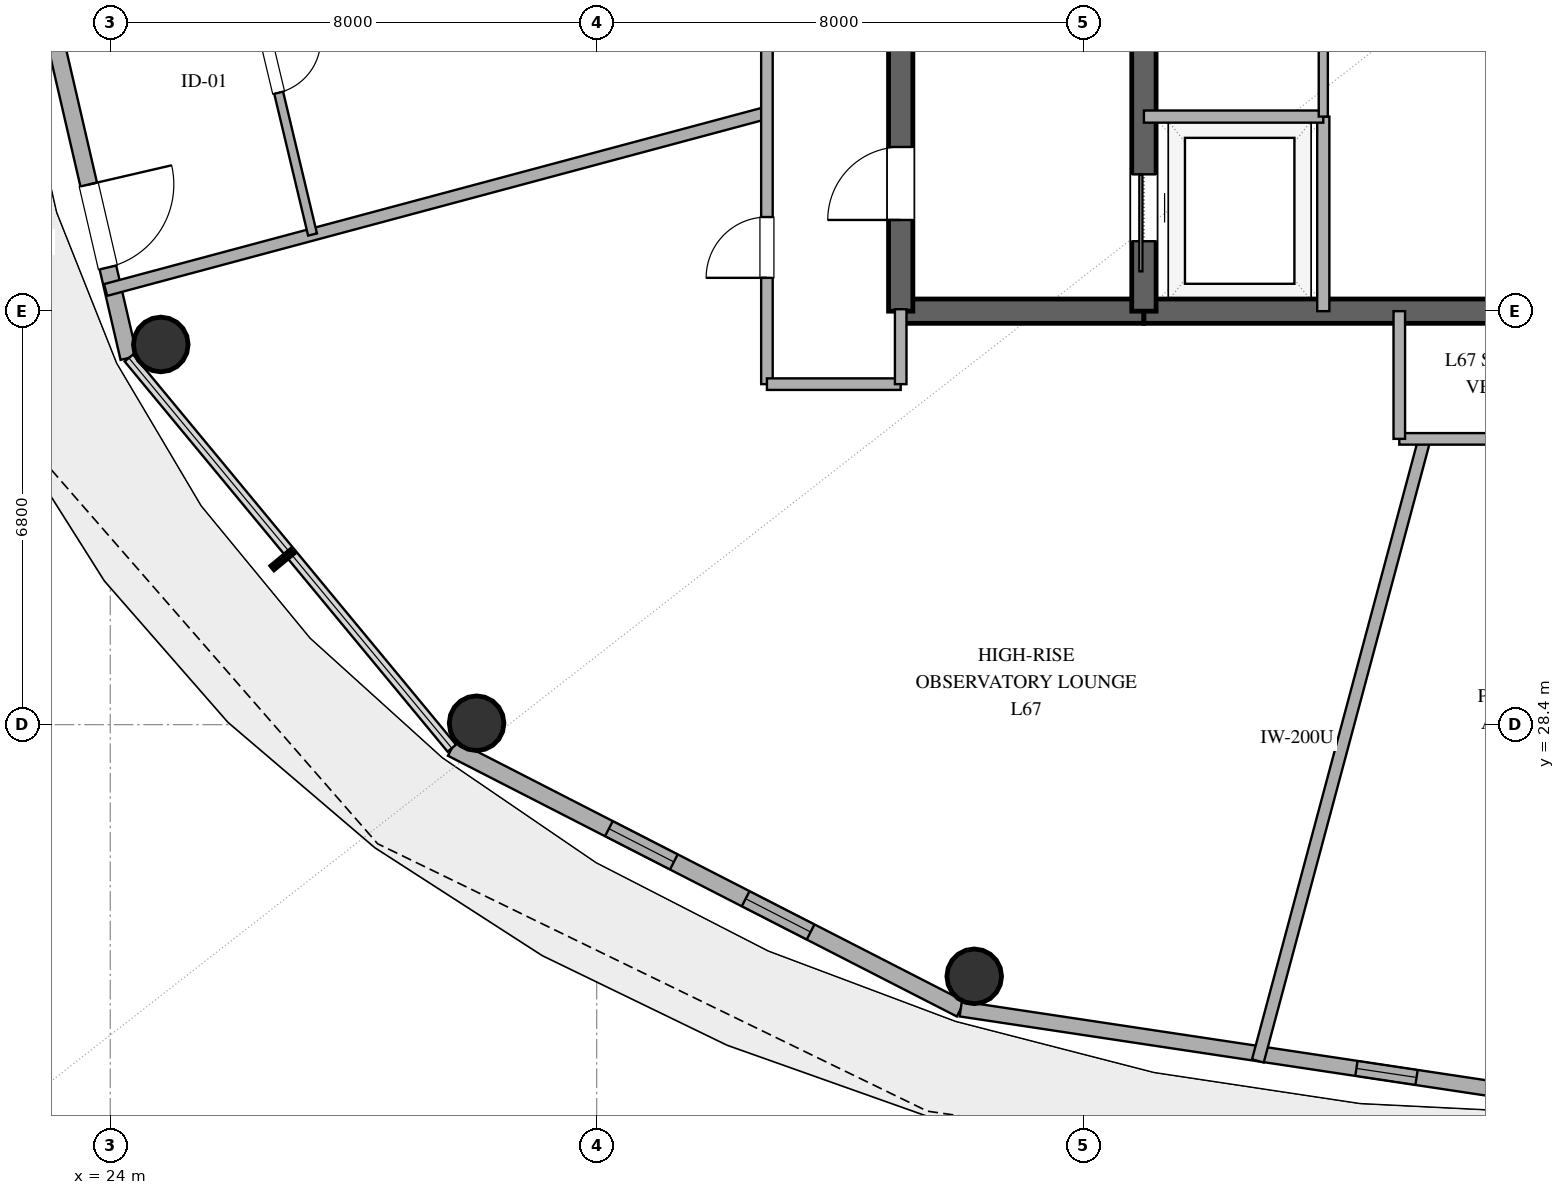
"""IFC4 building model, lengths in metres.
Left out: names, types, materials, properties, quantities, classifications, styles, units other than length and angle.
Written with IfcOpenShell. Run it as: python <this file> out.ifc"""

import sys

from ifc_helpers import new_model, si_unit, direction, frame, frame_2d, origin, origin_2d, place, context, subcontext, project, spatial, rectangle, hollow_circle, extrude, element, fill, save


model = new_model("IFC4")
c1 = context("Model", 3, precision=1e-05, world=origin(), true_north=direction((0.0, 1.0)))
c2 = subcontext(c1, "Body", "Model", "MODEL_VIEW")
j1 = project(units=[si_unit("LENGTHUNIT", "METRE"), si_unit("PLANEANGLEUNIT", "RADIAN")], contexts=[c1])
p1 = place(None, origin())
s1 = spatial("IfcSite", under=j1, at=p1, CompositionType="ELEMENT")
p2 = place(p1, origin())
s2 = spatial("IfcBuilding", under=s1, at=p2, CompositionType="ELEMENT")
p3 = place(p2, frame((0.0, 0.0, 262.2)))
s3 = spatial("IfcBuildingStorey", under=s2, at=p3, CompositionType="ELEMENT", Elevation=262.2)
p4 = place(p3, frame((37.0, 35.2, 0.0), z_axis=(0.0, 0.0, 1.0), x_axis=(1.0, 0.0, 0.0)))
e1 = element("IfcWall", 1, at=p4, inside=s3, PredefinedType="SHEAR", context=c2, shape_type="SweptSolid", body=[
    extrude(rectangle(XDim=4.0, YDim=0.4, at=frame_2d((2.0, 0.0))), origin(), (0.0, 0.0, 1.0), 3.37),
])
p5 = place(p3, frame((41.0, 35.2, 0.0), z_axis=(0.0, 0.0, 1.0), x_axis=(1.0, 0.0, 0.0)))
e2 = element("IfcWall", 2, at=p5, inside=s3, PredefinedType="SHEAR", context=c2, shape_type="SweptSolid", body=[
    extrude(rectangle(XDim=14.0, YDim=0.4, at=frame_2d((7.0, 0.0))), origin(), (0.0, 0.0, 1.0), 3.37),
])
p6 = place(p5, frame((6.1, 0.0, 0.0)))
e3 = element("IfcOpeningElement", 3, at=p6, cuts=e2, PredefinedType="OPENING", context=c2, shape_type="SweptSolid", body=[
    extrude(rectangle(XDim=1.8, YDim=2.25, at=frame_2d((0.9, 1.125))), frame((0.0, 0.21, 0.0), z_axis=(0.0, -1.0, 0.0), x_axis=(1.0, 0.0, 0.0)), (0.0, 0.0, 1.0), 0.42),
])
p7 = place(p3, frame((37.0, 35.2, 0.0), z_axis=(0.0, 0.0, 1.0), x_axis=(0.0, 1.0, 0.0)))
e4 = element("IfcWall", 4, at=p7, inside=s3, PredefinedType="SHEAR", context=c2, shape_type="SweptSolid", body=[
    extrude(rectangle(XDim=13.6, YDim=0.4, at=frame_2d((6.8, 0.0))), origin(), (0.0, 0.0, 1.0), 3.37),
])
p8 = place(p7, frame((1.5, 0.0, 0.0)))
e5 = element("IfcOpeningElement", 5, at=p8, cuts=e4, PredefinedType="OPENING", context=c2, shape_type="SweptSolid", body=[
    extrude(rectangle(XDim=1.2, YDim=2.15, at=frame_2d((0.6, 1.075))), frame((0.0, 0.21, 0.0), z_axis=(0.0, -1.0, 0.0), x_axis=(1.0, 0.0, 0.0)), (0.0, 0.0, 1.0), 0.42),
])
p9 = place(p3, frame((41.0, 35.2, 0.0), z_axis=(0.0, 0.0, 1.0), x_axis=(0.0, 1.0, 0.0)))
e6 = element("IfcWall", 6, at=p9, inside=s3, PredefinedType="SHEAR", context=c2, shape_type="SweptSolid", body=[
    extrude(rectangle(XDim=13.6, YDim=0.4, at=frame_2d((6.8, 0.0))), origin(), (0.0, 0.0, 1.0), 3.37),
])
p10 = place(p9, frame((1.15, 0.0, 0.0)))
e7 = element("IfcOpeningElement", 7, at=p10, cuts=e6, PredefinedType="OPENING", context=c2, shape_type="SweptSolid", body=[
    extrude(rectangle(XDim=1.1, YDim=2.2, at=frame_2d((0.55, 1.1))), frame((0.0, 0.21, 0.0), z_axis=(0.0, -1.0, 0.0), x_axis=(1.0, 0.0, 0.0)), (0.0, 0.0, 1.0), 0.42),
])
for number, where, z_axis, x_axis in (
    (8, (24.831, 34.653, 0.0), (0.0, 0.0, 1.0), (1.0, 0.0, 0.0)),
    (9, (30.025, 28.424, 0.0), (0.0, 0.0, 1.0), (1.0, 0.0, 0.0)),
    (10, (38.209, 24.261, 0.0), (0.0, 0.0, 1.0), (1.0, 0.0, 0.0)),
):
    element("IfcColumn", number, at=place(p3, frame(where, z_axis=z_axis, x_axis=x_axis)), inside=s3, PredefinedType="COLUMN", context=c2, shape_type="SweptSolid", body=[
        extrude(hollow_circle(Radius=0.45, WallThickness=0.025, at=origin_2d()), origin(), (0.0, 0.0, 1.0), 3.37),
    ])
p11 = place(p3, frame((22.553, 42.0, 0.0), z_axis=(0.0, 0.0, 1.0), x_axis=(0.225635078214, -0.974211892495, 0.0)))
e11 = element("IfcWall", 11, at=p11, inside=s3, PredefinedType="SOLIDWALL", context=c2, shape_type="SweptSolid", body=[
    extrude(rectangle(XDim=7.77, YDim=0.28, at=frame_2d((3.885, 0.0))), origin(), (0.0, 0.0, 1.0), 3.37),
])
p12 = place(p11, frame((4.842, 0.0, 0.0)))
e12 = element("IfcOpeningElement", 12, at=p12, cuts=e11, PredefinedType="OPENING", context=c2, shape_type="SweptSolid", body=[
    extrude(rectangle(XDim=1.4, YDim=2.2, at=frame_2d((0.7, 1.1))), frame((0.0, 0.15, 0.0), z_axis=(0.0, -1.0, 0.0), x_axis=(1.0, 0.0, 0.0)), (0.0, 0.0, 1.0), 0.3),
])
p13 = place(p3, frame((29.617, 28.013, 0.0), z_axis=(0.0, 0.0, 1.0), x_axis=(0.890007394051, -0.455946091699, 0.0)))
e13 = element("IfcWall", 13, at=p13, inside=s3, PredefinedType="SOLIDWALL", context=c2, shape_type="SweptSolid", body=[
    extrude(rectangle(XDim=9.404, YDim=0.28, at=frame_2d((4.702, 0.0))), origin(), (0.0, 0.0, 1.0), 3.37),
])
p14 = place(p13, frame((2.903, 0.0, 0.85)))
e14 = element("IfcOpeningElement", 14, at=p14, cuts=e13, PredefinedType="OPENING", context=c2, shape_type="SweptSolid", body=[
    extrude(rectangle(XDim=1.2, YDim=1.8, at=frame_2d((0.6, 0.9))), frame((0.0, 0.15, 0.0), z_axis=(0.0, -1.0, 0.0), x_axis=(1.0, 0.0, 0.0)), (0.0, 0.0, 1.0), 0.3),
])
p15 = place(p13, frame((5.43, 0.0, 0.85)))
e15 = element("IfcOpeningElement", 15, at=p15, cuts=e13, PredefinedType="OPENING", context=c2, shape_type="SweptSolid", body=[
    extrude(rectangle(XDim=1.2, YDim=1.8, at=frame_2d((0.6, 0.9))), frame((0.0, 0.15, 0.0), z_axis=(0.0, -1.0, 0.0), x_axis=(1.0, 0.0, 0.0)), (0.0, 0.0, 1.0), 0.3),
])
p16 = place(p3, frame((37.987, 23.726, 0.0), z_axis=(0.0, 0.0, 1.0), x_axis=(0.988882522213, -0.148698881169, 0.0)))
e16 = element("IfcWall", 16, at=p16, inside=s3, PredefinedType="SOLIDWALL", context=c2, shape_type="SweptSolid", body=[
    extrude(rectangle(XDim=10.125, YDim=0.25, at=frame_2d((5.062, 0.0))), origin(), (0.0, 0.0, 1.0), 3.37),
])
p17 = place(p16, frame((6.581, 0.0, 1.42)))
e17 = element("IfcOpeningElement", 17, at=p17, cuts=e16, PredefinedType="OPENING", context=c2, shape_type="SweptSolid", body=[
    extrude(rectangle(XDim=1.0, YDim=1.05, at=frame_2d((0.5, 0.525))), frame((0.0, 0.135, 0.0), z_axis=(0.0, -1.0, 0.0), x_axis=(1.0, 0.0, 0.0)), (0.0, 0.0, 1.0), 0.27),
])
p18 = place(p3, frame((43.95, 35.2, 0.0), z_axis=(0.0, 0.0, 1.0), x_axis=(0.0, 1.0, 0.0)))
e18 = element("IfcWall", 18, at=p18, inside=s3, PredefinedType="SOLIDWALL", context=c2, shape_type="SweptSolid", body=[
    extrude(rectangle(XDim=3.2, YDim=0.2, at=frame_2d((1.6, 0.0))), origin(), (0.0, 0.0, 1.0), 2.73),
])
p19 = place(p3, frame((41.0, 38.4, 0.0), z_axis=(0.0, 0.0, 1.0), x_axis=(1.0, 0.0, 0.0)))
e19 = element("IfcWall", 19, at=p19, inside=s3, PredefinedType="SOLIDWALL", context=c2, shape_type="SweptSolid", body=[
    extrude(rectangle(XDim=2.95, YDim=0.2, at=frame_2d((1.475, 0.0))), origin(), (0.0, 0.0, 1.0), 2.73),
])
p20 = place(p3, frame((43.95, 38.4, 0.0), z_axis=(0.0, 0.0, 1.0), x_axis=(0.0, 1.0, 0.0)))
e20 = element("IfcWall", 20, at=p20, inside=s3, PredefinedType="PARTITIONING", context=c2, shape_type="SweptSolid", body=[
    extrude(rectangle(XDim=4.0, YDim=0.15, at=frame_2d((2.0, 0.0))), origin(), (0.0, 0.0, 1.0), 2.73),
])
p21 = place(p20, frame((1.5, 0.0, 0.0)))
e21 = element("IfcOpeningElement", 21, at=p21, cuts=e20, PredefinedType="OPENING", context=c2, shape_type="SweptSolid", body=[
    extrude(rectangle(XDim=0.9, YDim=2.15, at=frame_2d((0.45, 1.075))), frame((0.0, 0.085, 0.0), z_axis=(0.0, -1.0, 0.0), x_axis=(1.0, 0.0, 0.0)), (0.0, 0.0, 1.0), 0.17),
])
p22 = place(p3, frame((42.874, 22.87, 0.0), z_axis=(0.0, 0.0, 1.0), x_axis=(0.258827496332, 0.965923561749, 0.0)))
e22 = element("IfcWall", 22, at=p22, inside=s3, PredefinedType="PARTITIONING", context=c2, shape_type="SweptSolid", body=[
    extrude(rectangle(XDim=10.591, YDim=0.2, at=frame_2d((5.295, 0.0))), origin(), (0.0, 0.0, 1.0), 2.73),
])
p23 = place(p3, frame((23.924, 35.549, 0.0), z_axis=(0.0, 0.0, 1.0), x_axis=(0.965923661364, 0.258827124578, 0.0)))
e23 = element("IfcWall", 23, at=p23, inside=s3, PredefinedType="PARTITIONING", context=c2, shape_type="SweptSolid", body=[
    extrude(rectangle(XDim=11.26, YDim=0.2, at=frame_2d((5.63, 0.0))), origin(), (0.0, 0.0, 1.0), 2.73),
])
p24 = place(p3, frame((34.8, 34.0, 0.0), z_axis=(0.0, 0.0, 1.0), x_axis=(0.0, 1.0, 0.0)))
e24 = element("IfcWall", 24, at=p24, inside=s3, PredefinedType="PARTITIONING", context=c2, shape_type="SweptSolid", body=[
    extrude(rectangle(XDim=12.196, YDim=0.19, at=frame_2d((6.098, 0.0))), origin(), (0.0, 0.0, 1.0), 2.73),
])
p25 = place(p24, frame((1.748, 0.0, 0.0)))
e25 = element("IfcOpeningElement", 25, at=p25, cuts=e24, PredefinedType="OPENING", context=c2, shape_type="SweptSolid", body=[
    extrude(rectangle(XDim=1.0, YDim=2.2, at=frame_2d((0.5, 1.1))), frame((0.0, 0.105, 0.0), z_axis=(0.0, -1.0, 0.0), x_axis=(1.0, 0.0, 0.0)), (0.0, 0.0, 1.0), 0.21),
])
p26 = place(p3, frame((26.004, 42.0, 0.0), z_axis=(0.0, 0.0, 1.0), x_axis=(0.232304342064, -0.972643147644, 0.0)))
e26 = element("IfcWall", 26, at=p26, inside=s3, PredefinedType="PARTITIONING", context=c2, shape_type="SweptSolid", body=[
    extrude(rectangle(XDim=5.695, YDim=0.15, at=frame_2d((2.848, 0.0))), origin(), (0.0, 0.0, 1.0), 2.73),
])
p27 = place(p26, frame((2.398, 0.0, 0.0)))
e27 = element("IfcOpeningElement", 27, at=p27, cuts=e26, PredefinedType="OPENING", context=c2, shape_type="SweptSolid", body=[
    extrude(rectangle(XDim=0.9, YDim=2.1, at=frame_2d((0.45, 1.05))), frame((0.0, 0.085, 0.0), z_axis=(0.0, -1.0, 0.0), x_axis=(1.0, 0.0, 0.0)), (0.0, 0.0, 1.0), 0.17),
])
p28 = place(p3, frame((50.8, 33.1, 0.0), z_axis=(0.0, 0.0, 1.0), x_axis=(-1.0, 0.0, 0.0)))
e28 = element("IfcWall", 28, at=p28, inside=s3, PredefinedType="PARTITIONING", context=c2, shape_type="SweptSolid", body=[
    extrude(rectangle(XDim=5.6, YDim=0.19, at=frame_2d((2.8, 0.0))), origin(), (0.0, 0.0, 1.0), 2.73),
])
p29 = place(p28, frame((2.3, 0.0, 0.0)))
e29 = element("IfcOpeningElement", 29, at=p29, cuts=e28, PredefinedType="OPENING", context=c2, shape_type="SweptSolid", body=[
    extrude(rectangle(XDim=1.0, YDim=2.2, at=frame_2d((0.5, 1.1))), frame((0.0, 0.105, 0.0), z_axis=(0.0, -1.0, 0.0), x_axis=(1.0, 0.0, 0.0)), (0.0, 0.0, 1.0), 0.21),
])
p30 = place(p3, frame((37.0, 34.0, 0.0), z_axis=(0.0, 0.0, 1.0), x_axis=(-1.0, 0.0, 0.0)))
e30 = element("IfcWall", 30, at=p30, inside=s3, PredefinedType="PARTITIONING", context=c2, shape_type="SweptSolid", body=[
    extrude(rectangle(XDim=2.2, YDim=0.19, at=frame_2d((1.1, 0.0))), origin(), (0.0, 0.0, 1.0), 2.73),
])
p31 = place(p3, frame((45.2, 35.2, 0.0), z_axis=(0.0, 0.0, 1.0), x_axis=(0.0, -1.0, 0.0)))
e31 = element("IfcWall", 31, at=p31, inside=s3, PredefinedType="PARTITIONING", context=c2, shape_type="SweptSolid", body=[
    extrude(rectangle(XDim=2.1, YDim=0.19, at=frame_2d((1.05, 0.0))), origin(), (0.0, 0.0, 1.0), 2.73),
])
p32 = place(p3, frame((37.0, 35.232, 0.0), z_axis=(0.0, 0.0, 1.0), x_axis=(0.0, -1.0, 0.0)))
e32 = element("IfcWall", 32, at=p32, inside=s3, PredefinedType="PARTITIONING", context=c2, shape_type="SweptSolid", body=[
    extrude(rectangle(XDim=1.232, YDim=0.19, at=frame_2d((0.616, 0.0))), origin(), (0.0, 0.0, 1.0), 2.73),
])
p33 = place(p12, origin())
e33 = element("IfcDoor", 33, at=p33, inside=s3, OperationType="SINGLE_SWING_LEFT", PredefinedType="DOOR", context=c2, shape_type="SweptSolid", body=[
    extrude(rectangle(XDim=1.4, YDim=2.2, at=frame_2d((0.7, 1.1))), frame((0.0, 0.025, 0.0), z_axis=(0.0, -1.0, 0.0), x_axis=(1.0, 0.0, 0.0)), (0.0, 0.0, 1.0), 0.05),
])
fill(e12, e33)
p34 = place(p14, origin())
e34 = element("IfcWindow", 34, at=p34, inside=s3, PartitioningType="SINGLE_PANEL", PredefinedType="WINDOW", context=c2, shape_type="SweptSolid", body=[
    extrude(rectangle(XDim=1.2, YDim=1.8, at=frame_2d((0.6, 0.9))), frame((0.0, 0.03, 0.0), z_axis=(0.0, -1.0, 0.0), x_axis=(1.0, 0.0, 0.0)), (0.0, 0.0, 1.0), 0.06),
])
fill(e14, e34)
p35 = place(p15, origin())
e35 = element("IfcWindow", 35, at=p35, inside=s3, PartitioningType="SINGLE_PANEL", PredefinedType="WINDOW", context=c2, shape_type="SweptSolid", body=[
    extrude(rectangle(XDim=1.2, YDim=1.8, at=frame_2d((0.6, 0.9))), frame((0.0, 0.03, 0.0), z_axis=(0.0, -1.0, 0.0), x_axis=(1.0, 0.0, 0.0)), (0.0, 0.0, 1.0), 0.06),
])
fill(e15, e35)
p36 = place(p17, origin())
e36 = element("IfcWindow", 36, at=p36, inside=s3, PartitioningType="SINGLE_PANEL", PredefinedType="WINDOW", context=c2, shape_type="SweptSolid", body=[
    extrude(rectangle(XDim=1.0, YDim=1.05, at=frame_2d((0.5, 0.525))), frame((0.0, 0.03, 0.0), z_axis=(0.0, -1.0, 0.0), x_axis=(1.0, 0.0, 0.0)), (0.0, 0.0, 1.0), 0.06),
])
fill(e17, e36)
p37 = place(p10, origin())
e37 = element("IfcDoor", 37, at=p37, inside=s3, OperationType="SLIDING_TO_LEFT", PredefinedType="DOOR", context=c2, shape_type="SweptSolid", body=[
    extrude(rectangle(XDim=1.1, YDim=2.2, at=frame_2d((0.55, 1.1))), frame((0.0, 0.025, 0.0), z_axis=(0.0, -1.0, 0.0), x_axis=(1.0, 0.0, 0.0)), (0.0, 0.0, 1.0), 0.05),
])
fill(e7, e37)
p38 = place(p8, origin())
e38 = element("IfcDoor", 38, at=p38, inside=s3, OperationType="SINGLE_SWING_LEFT", PredefinedType="DOOR", context=c2, shape_type="SweptSolid", body=[
    extrude(rectangle(XDim=1.2, YDim=2.15, at=frame_2d((0.6, 1.075))), frame((0.0, 0.025, 0.0), z_axis=(0.0, -1.0, 0.0), x_axis=(1.0, 0.0, 0.0)), (0.0, 0.0, 1.0), 0.05),
])
fill(e5, e38)
p39 = place(p25, origin())
e39 = element("IfcDoor", 39, at=p39, inside=s3, OperationType="SINGLE_SWING_LEFT", PredefinedType="DOOR", context=c2, shape_type="SweptSolid", body=[
    extrude(rectangle(XDim=1.0, YDim=2.2, at=frame_2d((0.5, 1.1))), frame((0.0, 0.025, 0.0), z_axis=(0.0, -1.0, 0.0), x_axis=(1.0, 0.0, 0.0)), (0.0, 0.0, 1.0), 0.05),
])
fill(e25, e39)
p40 = place(p27, origin())
e40 = element("IfcDoor", 40, at=p40, inside=s3, OperationType="SINGLE_SWING_LEFT", PredefinedType="DOOR", context=c2, shape_type="SweptSolid", body=[
    extrude(rectangle(XDim=0.9, YDim=2.1, at=frame_2d((0.45, 1.05))), frame((0.0, 0.025, 0.0), z_axis=(0.0, -1.0, 0.0), x_axis=(1.0, 0.0, 0.0)), (0.0, 0.0, 1.0), 0.05),
])
fill(e27, e40)
save(model, sys.argv[1])
